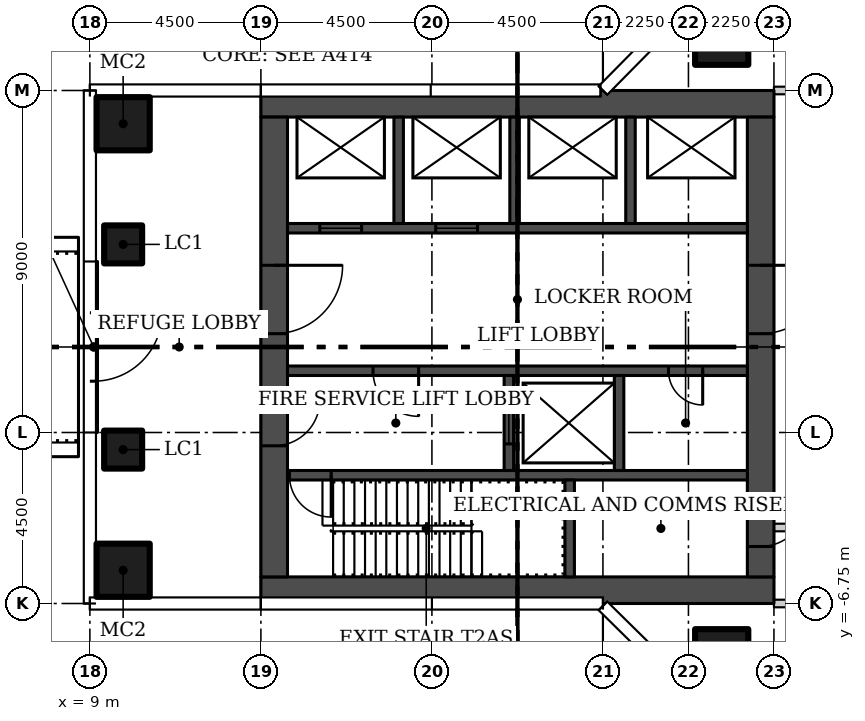
"""IFC4 building model, lengths in metres.
Left out: names, types, materials, properties, quantities, classifications, styles, units other than length and angle.
Written with IfcOpenShell. Run it as: python <this file> out.ifc"""

import sys

from ifc_helpers import new_model, si_unit, direction, frame, frame_2d, origin, origin_2d, place, context, subcontext, project, spatial, rectangle, hollow_rectangle, extrude, element, fill, save


model = new_model("IFC4")
c1 = context("Model", 3, precision=1e-05, world=origin(), true_north=direction((0.0, 1.0)))
c2 = subcontext(c1, "Body", "Model", "MODEL_VIEW")
j1 = project(units=[si_unit("LENGTHUNIT", "METRE"), si_unit("PLANEANGLEUNIT", "RADIAN")], contexts=[c1])
p1 = place(None, origin())
s1 = spatial("IfcSite", under=j1, at=p1, CompositionType="ELEMENT")
p2 = place(p1, origin())
s2 = spatial("IfcBuilding", under=s1, at=p2, CompositionType="ELEMENT")
p3 = place(p2, frame((0.0, 0.0, 77.1)))
s3 = spatial("IfcBuildingStorey", under=s2, at=p3, CompositionType="ELEMENT", Elevation=77.1)
for number, where in (
    (1, (25.625, 8.125, 0.0)),
    (2, (25.625, -8.125, 0.0)),
    (3, (9.875, -5.875, 0.0)),
    (4, (9.875, 5.875, 0.0)),
):
    element("IfcColumn", number, at=place(p3, frame(where)), inside=s3, PredefinedType="COLUMN", context=c2, shape_type="SweptSolid", body=[
        extrude(hollow_rectangle(XDim=1.4, YDim=1.4, WallThickness=0.05, at=origin_2d()), origin(), (0.0, 0.0, 1.0), 4.45),
    ])
for number, where in (
    (5, (9.875, -2.7, 0.0)),
    (6, (9.875, 2.7, 0.0)),
):
    element("IfcColumn", number, at=place(p3, frame(where)), inside=s3, PredefinedType="COLUMN", context=c2, shape_type="SweptSolid", body=[
        extrude(hollow_rectangle(XDim=1.0, YDim=1.0, WallThickness=0.04, at=origin_2d()), origin(), (0.0, 0.0, 1.0), 4.45),
    ])
p4 = place(p3, frame((40.5, -4.75, 0.0), z_axis=(0.0, 0.0, 1.0), x_axis=(-1.0, 0.0, 0.0)))
e7 = element("IfcWall", 7, at=p4, inside=s3, PredefinedType="PARTITIONING", context=c2, shape_type="SweptSolid", body=[
    extrude(rectangle(XDim=13.5, YDim=0.2, at=frame_2d((6.75, 0.0))), origin(), (0.0, 0.0, 1.0), 4.45),
])
p5 = place(p4, frame((6.0, 0.0, 0.0)))
e8 = element("IfcOpeningElement", 8, at=p5, cuts=e7, PredefinedType="OPENING", context=c2, shape_type="SweptSolid", body=[
    extrude(rectangle(XDim=1.5, YDim=2.4, at=frame_2d((0.75, 1.2))), frame((0.0, 0.11, 0.0), z_axis=(0.0, -1.0, 0.0), x_axis=(1.0, 0.0, 0.0)), (0.0, 0.0, 1.0), 0.22),
])
for number, where, z_axis, x_axis in (
    (9, (33.85, -6.75, 0.0), (0.0, 0.0, 1.0), (-1.0, 0.0, 0.0)),
    (10, (33.85, 6.75, 0.0), (0.0, 0.0, 1.0), (-1.0, 0.0, 0.0)),
):
    element("IfcWall", number, at=place(p3, frame(where, z_axis=z_axis, x_axis=x_axis)), inside=s3, PredefinedType="PARTITIONING", context=c2, shape_type="SweptSolid", body=[
        extrude(rectangle(XDim=6.85, YDim=0.2, at=frame_2d((3.425, 0.0))), origin(), (0.0, 0.0, 1.0), 4.45),
    ])
p6 = place(p3, frame((9.1, 2.25, 0.0), z_axis=(0.0, 0.0, 1.0), x_axis=(0.0, -1.0, 0.0)))
e11 = element("IfcWall", 11, at=p6, inside=s3, PredefinedType="PARTITIONING", context=c2, shape_type="SweptSolid", body=[
    extrude(rectangle(XDim=4.5, YDim=0.2, at=frame_2d((2.25, 0.0))), origin(), (0.0, 0.0, 1.0), 4.45),
])
p7 = place(p6, frame((1.35, 0.0, 0.0)))
e12 = element("IfcOpeningElement", 12, at=p7, cuts=e11, PredefinedType="OPENING", context=c2, shape_type="SweptSolid", body=[
    extrude(rectangle(XDim=1.8, YDim=2.1, at=frame_2d((0.9, 1.05))), frame((0.0, 0.11, 0.0), z_axis=(0.0, -1.0, 0.0), x_axis=(1.0, 0.0, 0.0)), (0.0, 0.0, 1.0), 0.22),
])
for number, where in (
    (13, (13.5, -6.4, 0.0)),
    (14, (13.5, 6.4, 0.0)),
):
    element("IfcWall", number, at=place(p3, frame(where)), inside=s3, PredefinedType="SHEAR", context=c2, shape_type="SweptSolid", body=[
        extrude(rectangle(XDim=13.5, YDim=0.7, at=frame_2d((6.75, 0.0))), origin(), (0.0, 0.0, 1.0), 4.45),
    ])
p8 = place(p3, frame((13.85, 6.05, 0.0), z_axis=(0.0, 0.0, 1.0), x_axis=(0.0, -1.0, 0.0)))
e15 = element("IfcWall", 15, at=p8, inside=s3, PredefinedType="SHEAR", context=c2, shape_type="SweptSolid", body=[
    extrude(rectangle(XDim=12.1, YDim=0.7, at=frame_2d((6.05, 0.0))), origin(), (0.0, 0.0, 1.0), 4.45),
])
p9 = place(p8, frame((7.45, 0.0, 0.0)))
e16 = element("IfcOpeningElement", 16, at=p9, cuts=e15, PredefinedType="OPENING", context=c2, shape_type="SweptSolid", body=[
    extrude(rectangle(XDim=1.2, YDim=2.1, at=frame_2d((0.6, 1.05))), frame((0.0, 0.36, 0.0), z_axis=(0.0, -1.0, 0.0), x_axis=(1.0, 0.0, 0.0)), (0.0, 0.0, 1.0), 0.72),
])
p10 = place(p8, frame((3.9, 0.0, 0.0)))
e17 = element("IfcOpeningElement", 17, at=p10, cuts=e15, PredefinedType="OPENING", context=c2, shape_type="SweptSolid", body=[
    extrude(rectangle(XDim=1.8, YDim=2.4, at=frame_2d((0.9, 1.2))), frame((0.0, 0.36, 0.0), z_axis=(0.0, -1.0, 0.0), x_axis=(1.0, 0.0, 0.0)), (0.0, 0.0, 1.0), 0.72),
])
p11 = place(p3, frame((26.65, 6.05, 0.0), z_axis=(0.0, 0.0, 1.0), x_axis=(0.0, -1.0, 0.0)))
e18 = element("IfcWall", 18, at=p11, inside=s3, PredefinedType="SHEAR", context=c2, shape_type="SweptSolid", body=[
    extrude(rectangle(XDim=12.1, YDim=0.7, at=frame_2d((6.05, 0.0))), origin(), (0.0, 0.0, 1.0), 4.45),
])
p12 = place(p11, frame((10.1, 0.0, 0.0)))
e19 = element("IfcOpeningElement", 19, at=p12, cuts=e18, PredefinedType="OPENING", context=c2, shape_type="SweptSolid", body=[
    extrude(rectangle(XDim=1.2, YDim=2.1, at=frame_2d((0.6, 1.05))), frame((0.0, 0.36, 0.0), z_axis=(0.0, -1.0, 0.0), x_axis=(1.0, 0.0, 0.0)), (0.0, 0.0, 1.0), 0.72),
])
p13 = place(p11, frame((3.9, 0.0, 0.0)))
e20 = element("IfcOpeningElement", 20, at=p13, cuts=e18, PredefinedType="OPENING", context=c2, shape_type="SweptSolid", body=[
    extrude(rectangle(XDim=1.8, YDim=2.4, at=frame_2d((0.9, 1.2))), frame((0.0, 0.36, 0.0), z_axis=(0.0, -1.0, 0.0), x_axis=(1.0, 0.0, 0.0)), (0.0, 0.0, 1.0), 0.72),
])
p14 = place(p3, frame((26.3, -3.375, 0.0), z_axis=(0.0, 0.0, 1.0), x_axis=(-1.0, 0.0, 0.0)))
e21 = element("IfcWall", 21, at=p14, inside=s3, PredefinedType="SHEAR", context=c2, shape_type="SweptSolid", body=[
    extrude(rectangle(XDim=12.1, YDim=0.25, at=frame_2d((6.05, 0.0))), origin(), (0.0, 0.0, 1.0), 4.45),
])
p15 = place(p14, frame((10.95, 0.0, 0.0)))
e22 = element("IfcOpeningElement", 22, at=p15, cuts=e21, PredefinedType="OPENING", context=c2, shape_type="SweptSolid", body=[
    extrude(rectangle(XDim=1.1, YDim=2.1, at=frame_2d((0.55, 1.05))), frame((0.0, 0.135, 0.0), z_axis=(0.0, -1.0, 0.0), x_axis=(1.0, 0.0, 0.0)), (0.0, 0.0, 1.0), 0.27),
])
p16 = place(p3, frame((21.625, -6.05, 0.0), z_axis=(0.0, 0.0, 1.0), x_axis=(0.0, 1.0, 0.0)))
e23 = element("IfcWall", 23, at=p16, inside=s3, PredefinedType="SHEAR", context=c2, shape_type="SweptSolid", body=[
    extrude(rectangle(XDim=2.55, YDim=0.25, at=frame_2d((1.275, 0.0))), origin(), (0.0, 0.0, 1.0), 4.45),
])
p17 = place(p3, frame((26.3, -0.625, 0.0), z_axis=(0.0, 0.0, 1.0), x_axis=(-1.0, 0.0, 0.0)))
e24 = element("IfcWall", 24, at=p17, inside=s3, PredefinedType="SHEAR", context=c2, shape_type="SweptSolid", body=[
    extrude(rectangle(XDim=12.1, YDim=0.25, at=frame_2d((6.05, 0.0))), origin(), (0.0, 0.0, 1.0), 4.45),
])
p18 = place(p17, frame((8.65, 0.0, 0.0)))
e25 = element("IfcOpeningElement", 25, at=p18, cuts=e24, PredefinedType="OPENING", context=c2, shape_type="SweptSolid", body=[
    extrude(rectangle(XDim=1.2, YDim=2.1, at=frame_2d((0.6, 1.05))), frame((0.0, 0.135, 0.0), z_axis=(0.0, -1.0, 0.0), x_axis=(1.0, 0.0, 0.0)), (0.0, 0.0, 1.0), 0.27),
])
p19 = place(p17, frame((1.175, 0.0, 0.0)))
e26 = element("IfcOpeningElement", 26, at=p19, cuts=e24, PredefinedType="OPENING", context=c2, shape_type="SweptSolid", body=[
    extrude(rectangle(XDim=0.9, YDim=2.1, at=frame_2d((0.45, 1.05))), frame((0.0, 0.135, 0.0), z_axis=(0.0, -1.0, 0.0), x_axis=(1.0, 0.0, 0.0)), (0.0, 0.0, 1.0), 0.27),
])
p20 = place(p3, frame((20.025, -3.25, 0.0), z_axis=(0.0, 0.0, 1.0), x_axis=(0.0, 1.0, 0.0)))
e27 = element("IfcWall", 27, at=p20, inside=s3, PredefinedType="SHEAR", context=c2, shape_type="SweptSolid", body=[
    extrude(rectangle(XDim=2.5, YDim=0.25, at=frame_2d((1.25, 0.0))), origin(), (0.0, 0.0, 1.0), 4.45),
])
p21 = place(p20, frame((0.7, 0.0, 0.0)))
e28 = element("IfcOpeningElement", 28, at=p21, cuts=e27, PredefinedType="OPENING", context=c2, shape_type="SweptSolid", body=[
    extrude(rectangle(XDim=1.1, YDim=2.1, at=frame_2d((0.55, 1.05))), frame((0.0, 0.135, 0.0), z_axis=(0.0, -1.0, 0.0), x_axis=(1.0, 0.0, 0.0)), (0.0, 0.0, 1.0), 0.27),
])
p22 = place(p3, frame((22.925, -3.25, 0.0), z_axis=(0.0, 0.0, 1.0), x_axis=(0.0, 1.0, 0.0)))
e29 = element("IfcWall", 29, at=p22, inside=s3, PredefinedType="SHEAR", context=c2, shape_type="SweptSolid", body=[
    extrude(rectangle(XDim=2.5, YDim=0.25, at=frame_2d((1.25, 0.0))), origin(), (0.0, 0.0, 1.0), 4.45),
])
p23 = place(p3, frame((14.2, 3.125, 0.0)))
e30 = element("IfcWall", 30, at=p23, inside=s3, PredefinedType="SHEAR", context=c2, shape_type="SweptSolid", body=[
    extrude(rectangle(XDim=12.1, YDim=0.25, at=frame_2d((6.05, 0.0))), origin(), (0.0, 0.0, 1.0), 4.45),
])
p24 = place(p23, frame((0.85, 0.0, 0.0)))
e31 = element("IfcOpeningElement", 31, at=p24, cuts=e30, PredefinedType="OPENING", context=c2, shape_type="SweptSolid", body=[
    extrude(rectangle(XDim=1.1, YDim=2.1, at=frame_2d((0.55, 1.05))), frame((0.0, 0.135, 0.0), z_axis=(0.0, -1.0, 0.0), x_axis=(1.0, 0.0, 0.0)), (0.0, 0.0, 1.0), 0.27),
])
p25 = place(p23, frame((3.9, 0.0, 0.0)))
e32 = element("IfcOpeningElement", 32, at=p25, cuts=e30, PredefinedType="OPENING", context=c2, shape_type="SweptSolid", body=[
    extrude(rectangle(XDim=1.1, YDim=2.1, at=frame_2d((0.55, 1.05))), frame((0.0, 0.135, 0.0), z_axis=(0.0, -1.0, 0.0), x_axis=(1.0, 0.0, 0.0)), (0.0, 0.0, 1.0), 0.27),
])
for number, where, z_axis, x_axis in (
    (33, (17.125, 3.25, 0.0), (0.0, 0.0, 1.0), (0.0, 1.0, 0.0)),
    (34, (20.175, 3.25, 0.0), (0.0, 0.0, 1.0), (0.0, 1.0, 0.0)),
    (35, (23.225, 3.25, 0.0), (0.0, 0.0, 1.0), (0.0, 1.0, 0.0)),
):
    element("IfcWall", number, at=place(p3, frame(where, z_axis=z_axis, x_axis=x_axis)), inside=s3, PredefinedType="SHEAR", context=c2, shape_type="SweptSolid", body=[
        extrude(rectangle(XDim=2.8, YDim=0.25, at=frame_2d((1.4, 0.0))), origin(), (0.0, 0.0, 1.0), 4.45),
    ])
p26 = place(p7, origin())
e36 = element("IfcDoor", 36, at=p26, inside=s3, OperationType="DOUBLE_DOOR_SINGLE_SWING", PredefinedType="DOOR", context=c2, shape_type="SweptSolid", body=[
    extrude(rectangle(XDim=1.8, YDim=2.1, at=frame_2d((0.9, 1.05))), frame((0.0, 0.025, 0.0), z_axis=(0.0, -1.0, 0.0), x_axis=(1.0, 0.0, 0.0)), (0.0, 0.0, 1.0), 0.05),
])
fill(e12, e36)
p27 = place(p9, origin())
e37 = element("IfcDoor", 37, at=p27, inside=s3, OperationType="SINGLE_SWING_RIGHT", PredefinedType="DOOR", context=c2, shape_type="SweptSolid", body=[
    extrude(rectangle(XDim=1.2, YDim=2.1, at=frame_2d((0.6, 1.05))), frame((0.0, 0.025, 0.0), z_axis=(0.0, -1.0, 0.0), x_axis=(1.0, 0.0, 0.0)), (0.0, 0.0, 1.0), 0.05),
])
fill(e16, e37)
p28 = place(p10, origin())
e38 = element("IfcDoor", 38, at=p28, inside=s3, OperationType="DOUBLE_DOOR_SINGLE_SWING", PredefinedType="DOOR", context=c2, shape_type="SweptSolid", body=[
    extrude(rectangle(XDim=1.8, YDim=2.4, at=frame_2d((0.9, 1.2))), frame((0.0, 0.025, 0.0), z_axis=(0.0, -1.0, 0.0), x_axis=(1.0, 0.0, 0.0)), (0.0, 0.0, 1.0), 0.05),
])
fill(e17, e38)
p29 = place(p12, origin())
e39 = element("IfcDoor", 39, at=p29, inside=s3, OperationType="SINGLE_SWING_RIGHT", PredefinedType="DOOR", context=c2, shape_type="SweptSolid", body=[
    extrude(rectangle(XDim=1.2, YDim=2.1, at=frame_2d((0.6, 1.05))), frame((0.0, 0.025, 0.0), z_axis=(0.0, -1.0, 0.0), x_axis=(1.0, 0.0, 0.0)), (0.0, 0.0, 1.0), 0.05),
])
fill(e19, e39)
p30 = place(p13, origin())
e40 = element("IfcDoor", 40, at=p30, inside=s3, OperationType="DOUBLE_DOOR_SINGLE_SWING", PredefinedType="DOOR", context=c2, shape_type="SweptSolid", body=[
    extrude(rectangle(XDim=1.8, YDim=2.4, at=frame_2d((0.9, 1.2))), frame((0.0, 0.025, 0.0), z_axis=(0.0, -1.0, 0.0), x_axis=(1.0, 0.0, 0.0)), (0.0, 0.0, 1.0), 0.05),
])
fill(e20, e40)
p31 = place(p15, origin())
e41 = element("IfcDoor", 41, at=p31, inside=s3, OperationType="SINGLE_SWING_RIGHT", PredefinedType="DOOR", context=c2, shape_type="SweptSolid", body=[
    extrude(rectangle(XDim=1.1, YDim=2.1, at=frame_2d((0.55, 1.05))), frame((0.0, 0.025, 0.0), z_axis=(0.0, -1.0, 0.0), x_axis=(1.0, 0.0, 0.0)), (0.0, 0.0, 1.0), 0.05),
])
fill(e22, e41)
p32 = place(p18, origin())
e42 = element("IfcDoor", 42, at=p32, inside=s3, OperationType="SINGLE_SWING_RIGHT", PredefinedType="DOOR", context=c2, shape_type="SweptSolid", body=[
    extrude(rectangle(XDim=1.2, YDim=2.1, at=frame_2d((0.6, 1.05))), frame((0.0, 0.025, 0.0), z_axis=(0.0, -1.0, 0.0), x_axis=(1.0, 0.0, 0.0)), (0.0, 0.0, 1.0), 0.05),
])
fill(e25, e42)
p33 = place(p19, origin())
e43 = element("IfcDoor", 43, at=p33, inside=s3, OperationType="SINGLE_SWING_LEFT", PredefinedType="DOOR", context=c2, shape_type="SweptSolid", body=[
    extrude(rectangle(XDim=0.9, YDim=2.1, at=frame_2d((0.45, 1.05))), frame((0.0, 0.025, 0.0), z_axis=(0.0, -1.0, 0.0), x_axis=(1.0, 0.0, 0.0)), (0.0, 0.0, 1.0), 0.05),
])
fill(e26, e43)
p34 = place(p21, origin())
e44 = element("IfcDoor", 44, at=p34, inside=s3, OperationType="SLIDING_TO_LEFT", PredefinedType="DOOR", context=c2, shape_type="SweptSolid", body=[
    extrude(rectangle(XDim=1.1, YDim=2.1, at=frame_2d((0.55, 1.05))), frame((0.0, 0.025, 0.0), z_axis=(0.0, -1.0, 0.0), x_axis=(1.0, 0.0, 0.0)), (0.0, 0.0, 1.0), 0.05),
])
fill(e28, e44)
p35 = place(p24, origin())
e45 = element("IfcDoor", 45, at=p35, inside=s3, OperationType="SLIDING_TO_LEFT", PredefinedType="DOOR", context=c2, shape_type="SweptSolid", body=[
    extrude(rectangle(XDim=1.1, YDim=2.1, at=frame_2d((0.55, 1.05))), frame((0.0, 0.025, 0.0), z_axis=(0.0, -1.0, 0.0), x_axis=(1.0, 0.0, 0.0)), (0.0, 0.0, 1.0), 0.05),
])
fill(e31, e45)
p36 = place(p25, origin())
e46 = element("IfcDoor", 46, at=p36, inside=s3, OperationType="SLIDING_TO_LEFT", PredefinedType="DOOR", context=c2, shape_type="SweptSolid", body=[
    extrude(rectangle(XDim=1.1, YDim=2.1, at=frame_2d((0.55, 1.05))), frame((0.0, 0.025, 0.0), z_axis=(0.0, -1.0, 0.0), x_axis=(1.0, 0.0, 0.0)), (0.0, 0.0, 1.0), 0.05),
])
fill(e32, e46)
save(model, sys.argv[1])
